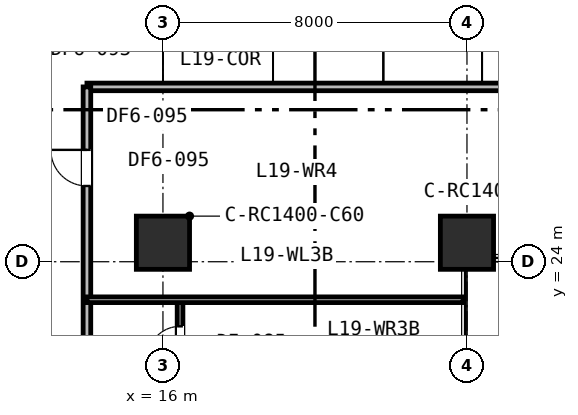
"""IFC4 building model, lengths in metres.
Left out: names, types, materials, properties, quantities, classifications, styles, units other than length and angle.
Written with IfcOpenShell. Run it as: python <this file> out.ifc"""

import sys

from ifc_helpers import new_model, si_unit, direction, frame, frame_2d, origin, origin_2d, place, context, subcontext, project, spatial, rectangle, extrude, element, fill, save


model = new_model("IFC4")
c1 = context("Model", 3, precision=1e-05, world=origin(), true_north=direction((0.0, 1.0)))
c2 = subcontext(c1, "Body", "Model", "MODEL_VIEW")
j1 = project(units=[si_unit("LENGTHUNIT", "METRE"), si_unit("PLANEANGLEUNIT", "RADIAN")], contexts=[c1])
p1 = place(None, origin())
s1 = spatial("IfcSite", under=j1, at=p1, CompositionType="ELEMENT")
p2 = place(p1, origin())
s2 = spatial("IfcBuilding", under=s1, at=p2, CompositionType="ELEMENT")
p3 = place(p2, frame((0.0, 0.0, 76.2)))
s3 = spatial("IfcBuildingStorey", under=s2, at=p3, CompositionType="ELEMENT", Elevation=76.2)
for number, where, z_axis, x_axis in (
    (1, (16.0, 24.5, 0.0), (0.0, 0.0, 1.0), (1.0, 0.0, 0.0)),
    (2, (24.0, 24.5, 0.0), (0.0, 0.0, 1.0), (1.0, 0.0, 0.0)),
):
    element("IfcColumn", number, at=place(p3, frame(where, z_axis=z_axis, x_axis=x_axis)), inside=s3, PredefinedType="COLUMN", context=c2, shape_type="SweptSolid", body=[
        extrude(rectangle(XDim=1.4, YDim=1.4, at=origin_2d()), origin(), (0.0, 0.0, 1.0), 3.6),
    ])
p4 = place(p3, frame((14.0, 28.6, 0.0), z_axis=(0.0, 0.0, 1.0), x_axis=(1.0, 0.0, 0.0)))
e3 = element("IfcWall", 3, at=p4, inside=s3, PredefinedType="PARTITIONING", context=c2, shape_type="SweptSolid", body=[
    extrude(rectangle(XDim=36.4, YDim=0.2, at=frame_2d((18.2, 0.0))), origin(), (0.0, 0.0, 1.0), 2.74),
])
p5 = place(p4, frame((15.475, 0.0, 0.0)))
e4 = element("IfcOpeningElement", 4, at=p5, cuts=e3, PredefinedType="OPENING", context=c2, shape_type="SweptSolid", body=[
    extrude(rectangle(XDim=0.95, YDim=2.15, at=frame_2d((0.475, 1.075))), frame((0.0, 0.11, 0.0), z_axis=(0.0, -1.0, 0.0), x_axis=(1.0, 0.0, 0.0)), (0.0, 0.0, 1.0), 0.22),
])
p6 = place(p4, frame((27.986, 0.0, 0.0)))
e5 = element("IfcOpeningElement", 5, at=p6, cuts=e3, PredefinedType="OPENING", context=c2, shape_type="SweptSolid", body=[
    extrude(rectangle(XDim=0.95, YDim=2.15, at=frame_2d((0.475, 1.075))), frame((0.0, 0.11, 0.0), z_axis=(0.0, -1.0, 0.0), x_axis=(1.0, 0.0, 0.0)), (0.0, 0.0, 1.0), 0.22),
])
p7 = place(p3, frame((14.0, 5.6, 0.0), z_axis=(0.0, 0.0, 1.0), x_axis=(0.0, 1.0, 0.0)))
e6 = element("IfcWall", 6, at=p7, inside=s3, PredefinedType="PARTITIONING", context=c2, shape_type="SweptSolid", body=[
    extrude(rectangle(XDim=23.0, YDim=0.2, at=frame_2d((11.5, 0.0))), origin(), (0.0, 0.0, 1.0), 2.74),
])
p8 = place(p7, frame((0.74, 0.0, 0.0)))
e7 = element("IfcOpeningElement", 7, at=p8, cuts=e6, PredefinedType="OPENING", context=c2, shape_type="SweptSolid", body=[
    extrude(rectangle(XDim=0.95, YDim=2.15, at=frame_2d((0.475, 1.075))), frame((0.0, 0.11, 0.0), z_axis=(0.0, -1.0, 0.0), x_axis=(1.0, 0.0, 0.0)), (0.0, 0.0, 1.0), 0.22),
])
p9 = place(p7, frame((6.271, 0.0, 0.0)))
e8 = element("IfcOpeningElement", 8, at=p9, cuts=e6, PredefinedType="OPENING", context=c2, shape_type="SweptSolid", body=[
    extrude(rectangle(XDim=0.95, YDim=2.15, at=frame_2d((0.475, 1.075))), frame((0.0, 0.11, 0.0), z_axis=(0.0, -1.0, 0.0), x_axis=(1.0, 0.0, 0.0)), (0.0, 0.0, 1.0), 0.22),
])
p10 = place(p7, frame((13.626, 0.0, 0.0)))
e9 = element("IfcOpeningElement", 9, at=p10, cuts=e6, PredefinedType="OPENING", context=c2, shape_type="SweptSolid", body=[
    extrude(rectangle(XDim=0.95, YDim=2.15, at=frame_2d((0.475, 1.075))), frame((0.0, 0.11, 0.0), z_axis=(0.0, -1.0, 0.0), x_axis=(1.0, 0.0, 0.0)), (0.0, 0.0, 1.0), 0.22),
])
p11 = place(p7, frame((20.393, 0.0, 0.0)))
e10 = element("IfcOpeningElement", 10, at=p11, cuts=e6, PredefinedType="OPENING", context=c2, shape_type="SweptSolid", body=[
    extrude(rectangle(XDim=0.95, YDim=2.15, at=frame_2d((0.475, 1.075))), frame((0.0, 0.11, 0.0), z_axis=(0.0, -1.0, 0.0), x_axis=(1.0, 0.0, 0.0)), (0.0, 0.0, 1.0), 0.22),
])
p12 = place(p3, frame((16.45, 20.75, 0.0), z_axis=(0.0, 0.0, 1.0), x_axis=(0.0, 1.0, 0.0)))
e11 = element("IfcWall", 11, at=p12, inside=s3, PredefinedType="PARTITIONING", context=c2, shape_type="SweptSolid", body=[
    extrude(rectangle(XDim=2.25, YDim=0.15, at=frame_2d((1.125, 0.0))), origin(), (0.0, 0.0, 1.0), 2.74),
])
p13 = place(p12, frame((0.7, 0.0, 0.0)))
e12 = element("IfcOpeningElement", 12, at=p13, cuts=e11, PredefinedType="OPENING", context=c2, shape_type="SweptSolid", body=[
    extrude(rectangle(XDim=0.85, YDim=2.15, at=frame_2d((0.425, 1.075))), frame((0.0, 0.085, 0.0), z_axis=(0.0, -1.0, 0.0), x_axis=(1.0, 0.0, 0.0)), (0.0, 0.0, 1.0), 0.17),
])
p14 = place(p3, frame((14.0, 23.0, 0.0), z_axis=(0.0, 0.0, 1.0), x_axis=(1.0, 0.0, 0.0)))
e13 = element("IfcWall", 13, at=p14, inside=s3, PredefinedType="PARTITIONING", context=c2, shape_type="SweptSolid", body=[
    extrude(rectangle(XDim=9.9, YDim=0.15, at=frame_2d((4.95, 0.0))), origin(), (0.0, 0.0, 1.0), 2.74),
])
p15 = place(p13, origin())
e14 = element("IfcDoor", 14, at=p15, inside=s3, OperationType="SINGLE_SWING_LEFT", PredefinedType="DOOR", context=c2, shape_type="SweptSolid", body=[
    extrude(rectangle(XDim=0.85, YDim=2.15, at=frame_2d((0.425, 1.075))), frame((0.0, 0.025, 0.0), z_axis=(0.0, -1.0, 0.0), x_axis=(1.0, 0.0, 0.0)), (0.0, 0.0, 1.0), 0.05),
])
fill(e12, e14)
p16 = place(p11, origin())
e15 = element("IfcDoor", 15, at=p16, inside=s3, OperationType="SINGLE_SWING_RIGHT", PredefinedType="DOOR", context=c2, shape_type="SweptSolid", body=[
    extrude(rectangle(XDim=0.95, YDim=2.15, at=frame_2d((0.475, 1.075))), frame((0.0, 0.025, 0.0), z_axis=(0.0, -1.0, 0.0), x_axis=(1.0, 0.0, 0.0)), (0.0, 0.0, 1.0), 0.05),
])
fill(e10, e15)
save(model, sys.argv[1])
